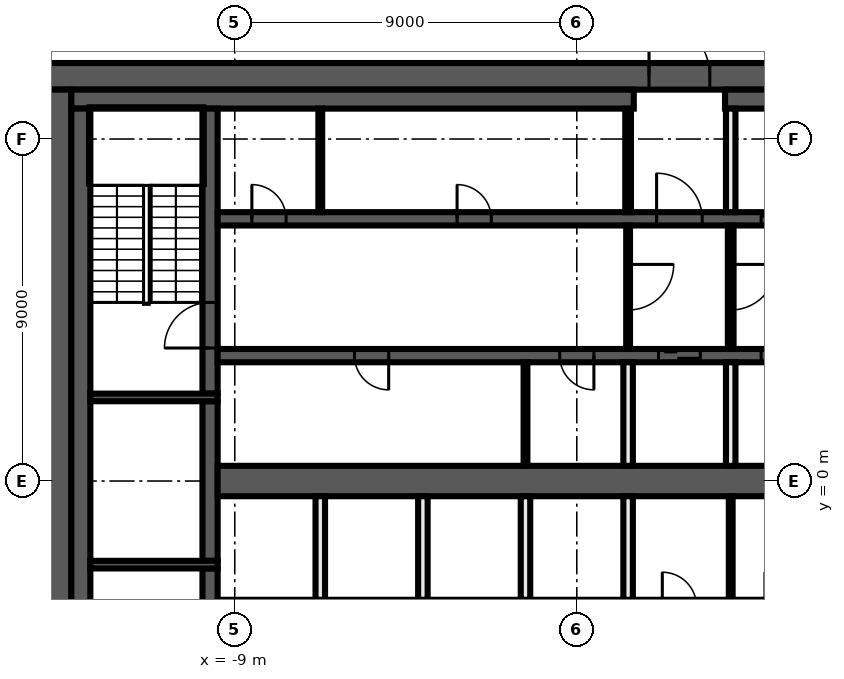
"""IFC4 building model, lengths in metres.
Left out: names, types, materials, properties, quantities, classifications, styles, units other than length and angle.
Written with IfcOpenShell. Run it as: python <this file> out.ifc"""

import sys

from ifc_helpers import new_model, si_unit, direction, frame, frame_2d, origin, place, context, subcontext, project, spatial, rectangle, extrude, element, fill, save


model = new_model("IFC4")
c1 = context("Model", 3, precision=1e-05, world=origin(), true_north=direction((0.0, 1.0)))
c2 = subcontext(c1, "Body", "Model", "MODEL_VIEW")
j1 = project(units=[si_unit("LENGTHUNIT", "METRE"), si_unit("PLANEANGLEUNIT", "RADIAN")], contexts=[c1])
p1 = place(None, origin())
s1 = spatial("IfcSite", under=j1, at=p1, CompositionType="ELEMENT")
p2 = place(p1, origin())
s2 = spatial("IfcBuilding", under=s1, at=p2, CompositionType="ELEMENT")
p3 = place(p2, frame((0.0, 0.0, 258.0)))
s3 = spatial("IfcBuildingStorey", under=s2, at=p3, CompositionType="ELEMENT", Elevation=258.0)
p4 = place(p3, frame((-14.0, 10.65, 0.0), z_axis=(0.0, 0.0, 1.0), x_axis=(1.0, 0.0, 0.0)))
e1 = element("IfcWall", 1, at=p4, inside=s3, PredefinedType="SHEAR", context=c2, shape_type="SweptSolid", body=[
    extrude(rectangle(XDim=28.0, YDim=0.7, at=frame_2d((14.0, 0.0))), origin(), (0.0, 0.0, 1.0), 3.82),
])
p5 = place(p4, frame((15.9, 0.0, 0.0)))
e2 = element("IfcOpeningElement", 2, at=p5, cuts=e1, PredefinedType="OPENING", context=c2, shape_type="SweptSolid", body=[
    extrude(rectangle(XDim=1.6, YDim=2.1, at=frame_2d((0.8, 1.05))), frame((0.0, 0.36, 0.0), z_axis=(0.0, -1.0, 0.0), x_axis=(1.0, 0.0, 0.0)), (0.0, 0.0, 1.0), 0.72),
])
p6 = place(p3, frame((-13.65, -10.3, 0.0), z_axis=(0.0, 0.0, 1.0), x_axis=(0.0, 1.0, 0.0)))
e3 = element("IfcWall", 3, at=p6, inside=s3, PredefinedType="SHEAR", context=c2, shape_type="SweptSolid", body=[
    extrude(rectangle(XDim=20.6, YDim=0.7, at=frame_2d((10.3, 0.0))), origin(), (0.0, 0.0, 1.0), 3.82),
])
p7 = place(p3, frame((-13.3, 10.05, 0.0), z_axis=(0.0, 0.0, 1.0), x_axis=(1.0, 0.0, 0.0)))
e4 = element("IfcWall", 4, at=p7, inside=s3, PredefinedType="SHEAR", context=c2, shape_type="SweptSolid", body=[
    extrude(rectangle(XDim=14.8, YDim=0.5, at=frame_2d((7.4, 0.0))), origin(), (0.0, 0.0, 1.0), 3.82),
])
p8 = place(p3, frame((3.9, 10.05, 0.0), z_axis=(0.0, 0.0, 1.0), x_axis=(1.0, 0.0, 0.0)))
e5 = element("IfcWall", 5, at=p8, inside=s3, PredefinedType="SHEAR", context=c2, shape_type="SweptSolid", body=[
    extrude(rectangle(XDim=9.4, YDim=0.5, at=frame_2d((4.7, 0.0))), origin(), (0.0, 0.0, 1.0), 3.82),
])
p9 = place(p3, frame((-13.05, -9.8, 0.0), z_axis=(0.0, 0.0, 1.0), x_axis=(0.0, 1.0, 0.0)))
e6 = element("IfcWall", 6, at=p9, inside=s3, PredefinedType="SHEAR", context=c2, shape_type="SweptSolid", body=[
    extrude(rectangle(XDim=19.6, YDim=0.5, at=frame_2d((9.8, 0.0))), origin(), (0.0, 0.0, 1.0), 3.82),
])
p10 = place(p3, frame((-9.65, -9.8, 0.0), z_axis=(0.0, 0.0, 1.0), x_axis=(0.0, 1.0, 0.0)))
e7 = element("IfcWall", 7, at=p10, inside=s3, PredefinedType="SHEAR", context=c2, shape_type="SweptSolid", body=[
    extrude(rectangle(XDim=7.5, YDim=0.4, at=frame_2d((3.75, 0.0))), origin(), (0.0, 0.0, 1.0), 3.82),
])
p11 = place(p10, frame((5.1, 0.0, 0.0)))
e8 = element("IfcOpeningElement", 8, at=p11, cuts=e7, PredefinedType="OPENING", context=c2, shape_type="SweptSolid", body=[
    extrude(rectangle(XDim=1.2, YDim=2.1, at=frame_2d((0.6, 1.05))), frame((0.0, 0.21, 0.0), z_axis=(0.0, -1.0, 0.0), x_axis=(1.0, 0.0, 0.0)), (0.0, 0.0, 1.0), 0.42),
])
p12 = place(p3, frame((-9.65, -2.1, 0.0), z_axis=(0.0, 0.0, 1.0), x_axis=(0.0, 1.0, 0.0)))
e9 = element("IfcWall", 9, at=p12, inside=s3, PredefinedType="SHEAR", context=c2, shape_type="SweptSolid", body=[
    extrude(rectangle(XDim=4.2, YDim=0.4, at=frame_2d((2.1, 0.0))), origin(), (0.0, 0.0, 1.0), 3.82),
])
p13 = place(p3, frame((-9.65, 2.3, 0.0), z_axis=(0.0, 0.0, 1.0), x_axis=(0.0, 1.0, 0.0)))
e10 = element("IfcWall", 10, at=p13, inside=s3, PredefinedType="SHEAR", context=c2, shape_type="SweptSolid", body=[
    extrude(rectangle(XDim=7.5, YDim=0.4, at=frame_2d((3.75, 0.0))), origin(), (0.0, 0.0, 1.0), 3.82),
])
p14 = place(p13, frame((1.2, 0.0, 0.0)))
e11 = element("IfcOpeningElement", 11, at=p14, cuts=e10, PredefinedType="OPENING", context=c2, shape_type="SweptSolid", body=[
    extrude(rectangle(XDim=1.2, YDim=2.1, at=frame_2d((0.6, 1.05))), frame((0.0, 0.21, 0.0), z_axis=(0.0, -1.0, 0.0), x_axis=(1.0, 0.0, 0.0)), (0.0, 0.0, 1.0), 0.42),
])
for number, where, z_axis, x_axis in (
    (12, (-9.45, 2.2, 0.0), (0.0, 0.0, 1.0), (-1.0, 0.0, 0.0)),
    (13, (-9.45, -2.2, 0.0), (0.0, 0.0, 1.0), (-1.0, 0.0, 0.0)),
):
    element("IfcWall", number, at=place(p3, frame(where, z_axis=z_axis, x_axis=x_axis)), inside=s3, PredefinedType="SHEAR", context=c2, shape_type="SweptSolid", body=[
        extrude(rectangle(XDim=3.35, YDim=0.2, at=frame_2d((1.675, 0.0))), origin(), (0.0, 0.0, 1.0), 3.82),
    ])
p15 = place(p3, frame((-9.45, 6.9, 0.0), z_axis=(0.0, 0.0, 1.0), x_axis=(1.0, 0.0, 0.0)))
e14 = element("IfcWall", 14, at=p15, inside=s3, PredefinedType="SHEAR", context=c2, shape_type="SweptSolid", body=[
    extrude(rectangle(XDim=18.9, YDim=0.35, at=frame_2d((9.45, 0.0))), origin(), (0.0, 0.0, 1.0), 3.82),
])
p16 = place(p15, frame((11.55, 0.0, 0.0)))
e15 = element("IfcOpeningElement", 15, at=p16, cuts=e14, PredefinedType="OPENING", context=c2, shape_type="SweptSolid", body=[
    extrude(rectangle(XDim=1.2, YDim=2.1, at=frame_2d((0.6, 1.05))), frame((0.0, 0.185, 0.0), z_axis=(0.0, -1.0, 0.0), x_axis=(1.0, 0.0, 0.0)), (0.0, 0.0, 1.0), 0.37),
])
p17 = place(p15, frame((14.3, 0.0, 0.0)))
e16 = element("IfcOpeningElement", 16, at=p17, cuts=e14, PredefinedType="OPENING", context=c2, shape_type="SweptSolid", body=[
    extrude(rectangle(XDim=1.1, YDim=2.1, at=frame_2d((0.55, 1.05))), frame((0.0, 0.185, 0.0), z_axis=(0.0, -1.0, 0.0), x_axis=(1.0, 0.0, 0.0)), (0.0, 0.0, 1.0), 0.37),
])
p18 = place(p15, frame((17.0, 0.0, 0.0)))
e17 = element("IfcOpeningElement", 17, at=p18, cuts=e14, PredefinedType="OPENING", context=c2, shape_type="SweptSolid", body=[
    extrude(rectangle(XDim=1.1, YDim=2.1, at=frame_2d((0.55, 1.05))), frame((0.0, 0.185, 0.0), z_axis=(0.0, -1.0, 0.0), x_axis=(1.0, 0.0, 0.0)), (0.0, 0.0, 1.0), 0.37),
])
p19 = place(p15, frame((0.9, 0.0, 0.0)))
e18 = element("IfcOpeningElement", 18, at=p19, cuts=e14, PredefinedType="OPENING", context=c2, shape_type="SweptSolid", body=[
    extrude(rectangle(XDim=0.9, YDim=2.1, at=frame_2d((0.45, 1.05))), frame((0.0, 0.185, 0.0), z_axis=(0.0, -1.0, 0.0), x_axis=(1.0, 0.0, 0.0)), (0.0, 0.0, 1.0), 0.37),
])
p20 = place(p15, frame((6.3, 0.0, 0.0)))
e19 = element("IfcOpeningElement", 19, at=p20, cuts=e14, PredefinedType="OPENING", context=c2, shape_type="SweptSolid", body=[
    extrude(rectangle(XDim=0.9, YDim=2.1, at=frame_2d((0.45, 1.05))), frame((0.0, 0.185, 0.0), z_axis=(0.0, -1.0, 0.0), x_axis=(1.0, 0.0, 0.0)), (0.0, 0.0, 1.0), 0.37),
])
p21 = place(p3, frame((9.45, 3.3, 0.0), z_axis=(0.0, 0.0, 1.0), x_axis=(-1.0, 0.0, 0.0)))
e20 = element("IfcWall", 20, at=p21, inside=s3, PredefinedType="SHEAR", context=c2, shape_type="SweptSolid", body=[
    extrude(rectangle(XDim=18.9, YDim=0.35, at=frame_2d((9.45, 0.0))), origin(), (0.0, 0.0, 1.0), 3.82),
])
p22 = place(p21, frame((6.2, 0.0, 0.0)))
e21 = element("IfcOpeningElement", 21, at=p22, cuts=e20, PredefinedType="OPENING", context=c2, shape_type="SweptSolid", body=[
    extrude(rectangle(XDim=1.1, YDim=2.1, at=frame_2d((0.55, 1.05))), frame((0.0, 0.185, 0.0), z_axis=(0.0, -1.0, 0.0), x_axis=(1.0, 0.0, 0.0)), (0.0, 0.0, 1.0), 0.37),
])
p23 = place(p21, frame((3.5, 0.0, 0.0)))
e22 = element("IfcOpeningElement", 22, at=p23, cuts=e20, PredefinedType="OPENING", context=c2, shape_type="SweptSolid", body=[
    extrude(rectangle(XDim=1.1, YDim=2.1, at=frame_2d((0.55, 1.05))), frame((0.0, 0.185, 0.0), z_axis=(0.0, -1.0, 0.0), x_axis=(1.0, 0.0, 0.0)), (0.0, 0.0, 1.0), 0.37),
])
p24 = place(p21, frame((0.9, 0.0, 0.0)))
e23 = element("IfcOpeningElement", 23, at=p24, cuts=e20, PredefinedType="OPENING", context=c2, shape_type="SweptSolid", body=[
    extrude(rectangle(XDim=0.9, YDim=2.1, at=frame_2d((0.45, 1.05))), frame((0.0, 0.185, 0.0), z_axis=(0.0, -1.0, 0.0), x_axis=(1.0, 0.0, 0.0)), (0.0, 0.0, 1.0), 0.37),
])
p25 = place(p21, frame((14.4, 0.0, 0.0)))
e24 = element("IfcOpeningElement", 24, at=p25, cuts=e20, PredefinedType="OPENING", context=c2, shape_type="SweptSolid", body=[
    extrude(rectangle(XDim=0.9, YDim=2.1, at=frame_2d((0.45, 1.05))), frame((0.0, 0.185, 0.0), z_axis=(0.0, -1.0, 0.0), x_axis=(1.0, 0.0, 0.0)), (0.0, 0.0, 1.0), 0.37),
])
p26 = place(p21, frame((9.0, 0.0, 0.0)))
e25 = element("IfcOpeningElement", 25, at=p26, cuts=e20, PredefinedType="OPENING", context=c2, shape_type="SweptSolid", body=[
    extrude(rectangle(XDim=0.9, YDim=2.1, at=frame_2d((0.45, 1.05))), frame((0.0, 0.185, 0.0), z_axis=(0.0, -1.0, 0.0), x_axis=(1.0, 0.0, 0.0)), (0.0, 0.0, 1.0), 0.37),
])
p27 = place(p3, frame((-9.45, 0.0, 0.0), z_axis=(0.0, 0.0, 1.0), x_axis=(1.0, 0.0, 0.0)))
e26 = element("IfcWall", 26, at=p27, inside=s3, PredefinedType="SHEAR", context=c2, shape_type="SweptSolid", body=[
    extrude(rectangle(XDim=18.9, YDim=0.8, at=frame_2d((9.45, 0.0))), origin(), (0.0, 0.0, 1.0), 3.82),
])
p28 = place(p3, frame((4.05, 6.725, 0.0), z_axis=(0.0, 0.0, 1.0), x_axis=(0.0, -1.0, 0.0)))
e27 = element("IfcWall", 27, at=p28, inside=s3, PredefinedType="PARTITIONING", context=c2, shape_type="SweptSolid", body=[
    extrude(rectangle(XDim=3.25, YDim=0.15, at=frame_2d((1.625, 0.0))), origin(), (0.0, 0.0, 1.0), 3.82),
])
p29 = place(p28, frame((1.025, 0.0, 0.0)))
e28 = element("IfcOpeningElement", 28, at=p29, cuts=e27, PredefinedType="OPENING", context=c2, shape_type="SweptSolid", body=[
    extrude(rectangle(XDim=1.2, YDim=2.1, at=frame_2d((0.6, 1.05))), frame((0.0, 0.085, 0.0), z_axis=(0.0, -1.0, 0.0), x_axis=(1.0, 0.0, 0.0)), (0.0, 0.0, 1.0), 0.17),
])
p30 = place(p3, frame((4.05, -3.125, 0.0), z_axis=(0.0, 0.0, 1.0), x_axis=(0.0, 1.0, 0.0)))
e29 = element("IfcWall", 29, at=p30, inside=s3, PredefinedType="PARTITIONING", context=c2, shape_type="SweptSolid", body=[
    extrude(rectangle(XDim=2.725, YDim=0.1, at=frame_2d((1.363, 0.0))), origin(), (0.0, 0.0, 1.0), 3.82),
])
for number, where, z_axis, x_axis in (
    (30, (4.05, 0.4, 0.0), (0.0, 0.0, 1.0), (0.0, 1.0, 0.0)),
    (31, (4.05, 7.075, 0.0), (0.0, 0.0, 1.0), (0.0, 1.0, 0.0)),
):
    element("IfcWall", number, at=place(p3, frame(where, z_axis=z_axis, x_axis=x_axis)), inside=s3, PredefinedType="SOLIDWALL", context=c2, shape_type="SweptSolid", body=[
        extrude(rectangle(XDim=2.725, YDim=0.25, at=frame_2d((1.363, 0.0))), origin(), (0.0, 0.0, 1.0), 3.82),
    ])
p31 = place(p3, frame((1.35, 7.075, 0.0), z_axis=(0.0, 0.0, 1.0), x_axis=(0.0, 1.0, 0.0)))
e32 = element("IfcWall", 32, at=p31, inside=s3, PredefinedType="PARTITIONING", context=c2, shape_type="SweptSolid", body=[
    extrude(rectangle(XDim=2.725, YDim=0.15, at=frame_2d((1.363, 0.0))), origin(), (0.0, 0.0, 1.0), 3.82),
])
p32 = place(p3, frame((1.35, 6.725, 0.0), z_axis=(0.0, 0.0, 1.0), x_axis=(0.0, -1.0, 0.0)))
e33 = element("IfcWall", 33, at=p32, inside=s3, PredefinedType="PARTITIONING", context=c2, shape_type="SweptSolid", body=[
    extrude(rectangle(XDim=3.25, YDim=0.1, at=frame_2d((1.625, 0.0))), origin(), (0.0, 0.0, 1.0), 3.82),
])
p33 = place(p32, frame((1.025, 0.0, 0.0)))
e34 = element("IfcOpeningElement", 34, at=p33, cuts=e33, PredefinedType="OPENING", context=c2, shape_type="SweptSolid", body=[
    extrude(rectangle(XDim=1.2, YDim=2.1, at=frame_2d((0.6, 1.05))), frame((0.0, 0.06, 0.0), z_axis=(0.0, -1.0, 0.0), x_axis=(1.0, 0.0, 0.0)), (0.0, 0.0, 1.0), 0.12),
])
for number, where, z_axis, x_axis in (
    (35, (1.35, -3.125, 0.0), (0.0, 0.0, 1.0), (0.0, 1.0, 0.0)),
    (36, (1.35, 0.4, 0.0), (0.0, 0.0, 1.0), (0.0, 1.0, 0.0)),
):
    element("IfcWall", number, at=place(p3, frame(where, z_axis=z_axis, x_axis=x_axis)), inside=s3, PredefinedType="SOLIDWALL", context=c2, shape_type="SweptSolid", body=[
        extrude(rectangle(XDim=2.725, YDim=0.25, at=frame_2d((1.363, 0.0))), origin(), (0.0, 0.0, 1.0), 3.82),
    ])
p34 = place(p3, frame((-1.35, 0.4, 0.0), z_axis=(0.0, 0.0, 1.0), x_axis=(0.0, 1.0, 0.0)))
e37 = element("IfcWall", 37, at=p34, inside=s3, PredefinedType="PARTITIONING", context=c2, shape_type="SweptSolid", body=[
    extrude(rectangle(XDim=2.725, YDim=0.1, at=frame_2d((1.363, 0.0))), origin(), (0.0, 0.0, 1.0), 3.82),
])
for number, where, z_axis, x_axis in (
    (38, (-1.35, -3.125, 0.0), (0.0, 0.0, 1.0), (0.0, 1.0, 0.0)),
    (39, (-4.05, -3.125, 0.0), (0.0, 0.0, 1.0), (0.0, 1.0, 0.0)),
):
    element("IfcWall", number, at=place(p3, frame(where, z_axis=z_axis, x_axis=x_axis)), inside=s3, PredefinedType="SOLIDWALL", context=c2, shape_type="SweptSolid", body=[
        extrude(rectangle(XDim=2.725, YDim=0.25, at=frame_2d((1.363, 0.0))), origin(), (0.0, 0.0, 1.0), 3.82),
    ])
p35 = place(p3, frame((-6.75, 7.075, 0.0), z_axis=(0.0, 0.0, 1.0), x_axis=(0.0, 1.0, 0.0)))
e40 = element("IfcWall", 40, at=p35, inside=s3, PredefinedType="PARTITIONING", context=c2, shape_type="SweptSolid", body=[
    extrude(rectangle(XDim=2.725, YDim=0.1, at=frame_2d((1.363, 0.0))), origin(), (0.0, 0.0, 1.0), 3.82),
])
p36 = place(p3, frame((-6.75, -3.125, 0.0), z_axis=(0.0, 0.0, 1.0), x_axis=(0.0, 1.0, 0.0)))
e41 = element("IfcWall", 41, at=p36, inside=s3, PredefinedType="SOLIDWALL", context=c2, shape_type="SweptSolid", body=[
    extrude(rectangle(XDim=2.725, YDim=0.25, at=frame_2d((1.363, 0.0))), origin(), (0.0, 0.0, 1.0), 3.82),
])
p37 = place(p5, origin())
e42 = element("IfcDoor", 42, at=p37, inside=s3, OperationType="DOUBLE_DOOR_SINGLE_SWING", PredefinedType="DOOR", context=c2, shape_type="SweptSolid", body=[
    extrude(rectangle(XDim=1.6, YDim=2.1, at=frame_2d((0.8, 1.05))), frame((0.0, 0.025, 0.0), z_axis=(0.0, -1.0, 0.0), x_axis=(1.0, 0.0, 0.0)), (0.0, 0.0, 1.0), 0.05),
])
fill(e2, e42)
p38 = place(p16, origin())
e43 = element("IfcDoor", 43, at=p38, inside=s3, OperationType="SINGLE_SWING_LEFT", PredefinedType="DOOR", context=c2, shape_type="SweptSolid", body=[
    extrude(rectangle(XDim=1.2, YDim=2.1, at=frame_2d((0.6, 1.05))), frame((0.0, 0.025, 0.0), z_axis=(0.0, -1.0, 0.0), x_axis=(1.0, 0.0, 0.0)), (0.0, 0.0, 1.0), 0.05),
])
fill(e15, e43)
p39 = place(p17, origin())
e44 = element("IfcDoor", 44, at=p39, inside=s3, OperationType="DOUBLE_DOOR_SLIDING", PredefinedType="DOOR", context=c2, shape_type="SweptSolid", body=[
    extrude(rectangle(XDim=1.1, YDim=2.1, at=frame_2d((0.55, 1.05))), frame((0.0, 0.025, 0.0), z_axis=(0.0, -1.0, 0.0), x_axis=(1.0, 0.0, 0.0)), (0.0, 0.0, 1.0), 0.05),
])
fill(e16, e44)
p40 = place(p22, origin())
e45 = element("IfcDoor", 45, at=p40, inside=s3, OperationType="DOUBLE_DOOR_SLIDING", PredefinedType="DOOR", context=c2, shape_type="SweptSolid", body=[
    extrude(rectangle(XDim=1.1, YDim=2.1, at=frame_2d((0.55, 1.05))), frame((0.0, 0.025, 0.0), z_axis=(0.0, -1.0, 0.0), x_axis=(1.0, 0.0, 0.0)), (0.0, 0.0, 1.0), 0.05),
])
fill(e21, e45)
p41 = place(p23, origin())
e46 = element("IfcDoor", 46, at=p41, inside=s3, OperationType="DOUBLE_DOOR_SLIDING", PredefinedType="DOOR", context=c2, shape_type="SweptSolid", body=[
    extrude(rectangle(XDim=1.1, YDim=2.1, at=frame_2d((0.55, 1.05))), frame((0.0, 0.025, 0.0), z_axis=(0.0, -1.0, 0.0), x_axis=(1.0, 0.0, 0.0)), (0.0, 0.0, 1.0), 0.05),
])
fill(e22, e46)
p42 = place(p19, origin())
e47 = element("IfcDoor", 47, at=p42, inside=s3, OperationType="SINGLE_SWING_RIGHT", PredefinedType="DOOR", context=c2, shape_type="SweptSolid", body=[
    extrude(rectangle(XDim=0.9, YDim=2.1, at=frame_2d((0.45, 1.05))), frame((0.0, 0.025, 0.0), z_axis=(0.0, -1.0, 0.0), x_axis=(1.0, 0.0, 0.0)), (0.0, 0.0, 1.0), 0.05),
])
fill(e18, e47)
p43 = place(p20, origin())
e48 = element("IfcDoor", 48, at=p43, inside=s3, OperationType="SINGLE_SWING_LEFT", PredefinedType="DOOR", context=c2, shape_type="SweptSolid", body=[
    extrude(rectangle(XDim=0.9, YDim=2.1, at=frame_2d((0.45, 1.05))), frame((0.0, 0.025, 0.0), z_axis=(0.0, -1.0, 0.0), x_axis=(1.0, 0.0, 0.0)), (0.0, 0.0, 1.0), 0.05),
])
fill(e19, e48)
p44 = place(p25, origin())
e49 = element("IfcDoor", 49, at=p44, inside=s3, OperationType="SINGLE_SWING_RIGHT", PredefinedType="DOOR", context=c2, shape_type="SweptSolid", body=[
    extrude(rectangle(XDim=0.9, YDim=2.1, at=frame_2d((0.45, 1.05))), frame((0.0, 0.025, 0.0), z_axis=(0.0, -1.0, 0.0), x_axis=(1.0, 0.0, 0.0)), (0.0, 0.0, 1.0), 0.05),
])
fill(e24, e49)
p45 = place(p26, origin())
e50 = element("IfcDoor", 50, at=p45, inside=s3, OperationType="SINGLE_SWING_LEFT", PredefinedType="DOOR", context=c2, shape_type="SweptSolid", body=[
    extrude(rectangle(XDim=0.9, YDim=2.1, at=frame_2d((0.45, 1.05))), frame((0.0, 0.025, 0.0), z_axis=(0.0, -1.0, 0.0), x_axis=(1.0, 0.0, 0.0)), (0.0, 0.0, 1.0), 0.05),
])
fill(e25, e50)
p46 = place(p14, origin())
e51 = element("IfcDoor", 51, at=p46, inside=s3, OperationType="SINGLE_SWING_RIGHT", PredefinedType="DOOR", context=c2, shape_type="SweptSolid", body=[
    extrude(rectangle(XDim=1.2, YDim=2.1, at=frame_2d((0.6, 1.05))), frame((0.0, 0.025, 0.0), z_axis=(0.0, -1.0, 0.0), x_axis=(1.0, 0.0, 0.0)), (0.0, 0.0, 1.0), 0.05),
])
fill(e11, e51)
p47 = place(p33, origin())
e52 = element("IfcDoor", 52, at=p47, inside=s3, OperationType="SINGLE_SWING_LEFT", PredefinedType="DOOR", context=c2, shape_type="SweptSolid", body=[
    extrude(rectangle(XDim=1.2, YDim=2.1, at=frame_2d((0.6, 1.05))), frame((0.0, 0.025, 0.0), z_axis=(0.0, -1.0, 0.0), x_axis=(1.0, 0.0, 0.0)), (0.0, 0.0, 1.0), 0.05),
])
fill(e34, e52)
p48 = place(p29, origin())
e53 = element("IfcDoor", 53, at=p48, inside=s3, OperationType="SINGLE_SWING_RIGHT", PredefinedType="DOOR", context=c2, shape_type="SweptSolid", body=[
    extrude(rectangle(XDim=1.2, YDim=2.1, at=frame_2d((0.6, 1.05))), frame((0.0, 0.025, 0.0), z_axis=(0.0, -1.0, 0.0), x_axis=(1.0, 0.0, 0.0)), (0.0, 0.0, 1.0), 0.05),
])
fill(e28, e53)
save(model, sys.argv[1])
